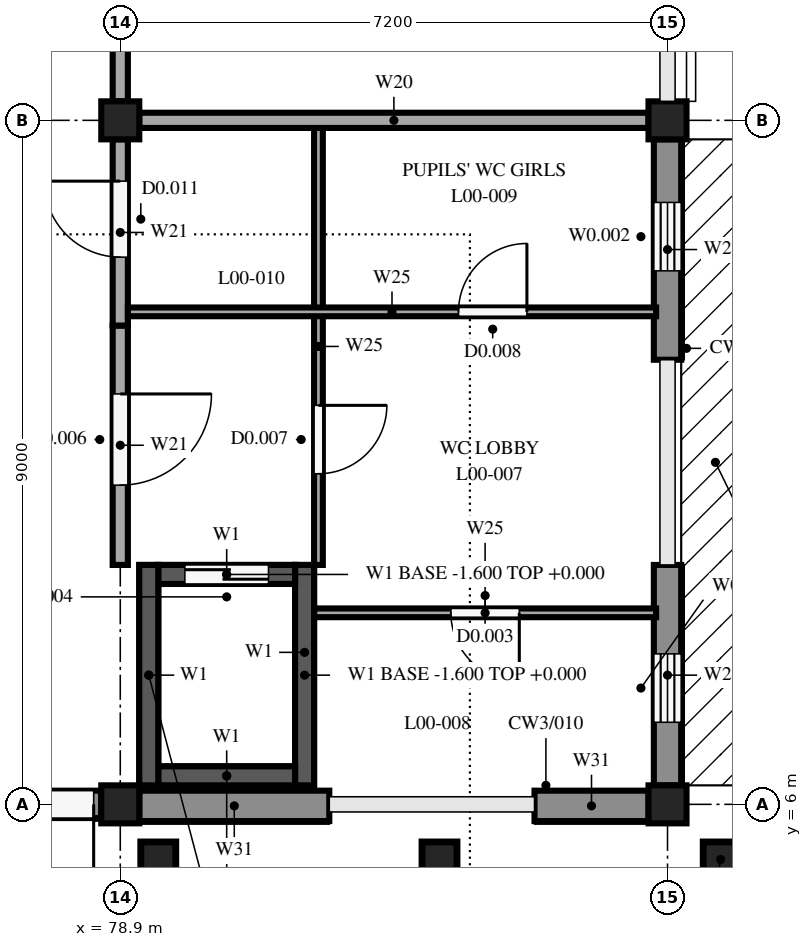
"""IFC4 building model, lengths in metres.
Left out: names, types, materials, properties, quantities, classifications, styles, units other than length and angle.
Written with IfcOpenShell. Run it as: python <this file> out.ifc"""

import sys

from ifc_helpers import new_model, si_unit, direction, frame, frame_2d, origin, origin_2d, place, context, subcontext, project, spatial, rectangle, extrude, element, fill, save


model = new_model("IFC4")
c1 = context("Model", 3, precision=1e-05, world=origin(), true_north=direction((0.0, 1.0)))
c2 = subcontext(c1, "Body", "Model", "MODEL_VIEW")
j1 = project(units=[si_unit("LENGTHUNIT", "METRE"), si_unit("PLANEANGLEUNIT", "RADIAN")], contexts=[c1])
p1 = place(None, origin())
s1 = spatial("IfcSite", under=j1, at=p1, CompositionType="ELEMENT")
p2 = place(p1, origin())
s2 = spatial("IfcBuilding", under=s1, at=p2, CompositionType="ELEMENT")
p3 = place(p2, origin())
s3 = spatial("IfcBuildingStorey", under=s2, at=p3, CompositionType="ELEMENT", Elevation=0.0)
for number, where, z_axis, x_axis in (
    (1, (78.9, 6.0, 0.0), (0.0, 0.0, 1.0), (1.0, 0.0, 0.0)),
    (2, (78.9, 15.0, 0.0), (0.0, 0.0, 1.0), (1.0, 0.0, 0.0)),
    (3, (86.1, 6.0, 0.0), (0.0, 0.0, 1.0), (1.0, 0.0, 0.0)),
    (4, (86.1, 15.0, 0.0), (0.0, 0.0, 1.0), (1.0, 0.0, 0.0)),
):
    element("IfcColumn", number, at=place(p3, frame(where, z_axis=z_axis, x_axis=x_axis)), inside=s3, PredefinedType="COLUMN", context=c2, shape_type="SweptSolid", body=[
        extrude(rectangle(XDim=0.5, YDim=0.5, at=origin_2d()), origin(), (0.0, 0.0, 1.0), 4.25),
    ])
for number, where, z_axis, x_axis in (
    (5, (79.275, 6.25, 0.0), (0.0, 0.0, 1.0), (0.0, 1.0, 0.0)),
    (6, (81.325, 6.25, 0.0), (0.0, 0.0, 1.0), (0.0, 1.0, 0.0)),
):
    element("IfcWall", number, at=place(p3, frame(where, z_axis=z_axis, x_axis=x_axis)), inside=s3, PredefinedType="SHEAR", context=c2, shape_type="SweptSolid", body=[
        extrude(rectangle(XDim=2.9, YDim=0.25, at=frame_2d((1.45, 0.0))), origin(), (0.0, 0.0, 1.0), 4.25),
    ])
p4 = place(p3, frame((79.4, 6.375, 0.0), z_axis=(0.0, 0.0, 1.0), x_axis=(1.0, 0.0, 0.0)))
e7 = element("IfcWall", 7, at=p4, inside=s3, PredefinedType="SHEAR", context=c2, shape_type="SweptSolid", body=[
    extrude(rectangle(XDim=1.8, YDim=0.25, at=frame_2d((0.9, 0.0))), origin(), (0.0, 0.0, 1.0), 4.25),
])
p5 = place(p3, frame((79.4, 9.025, 0.0), z_axis=(0.0, 0.0, 1.0), x_axis=(1.0, 0.0, 0.0)))
e8 = element("IfcWall", 8, at=p5, inside=s3, PredefinedType="SHEAR", context=c2, shape_type="SweptSolid", body=[
    extrude(rectangle(XDim=1.8, YDim=0.25, at=frame_2d((0.9, 0.0))), origin(), (0.0, 0.0, 1.0), 4.25),
])
p6 = place(p5, frame((0.35, 0.0, 0.0)))
e9 = element("IfcOpeningElement", 9, at=p6, cuts=e8, PredefinedType="OPENING", context=c2, shape_type="SweptSolid", body=[
    extrude(rectangle(XDim=1.1, YDim=2.1, at=frame_2d((0.55, 1.05))), frame((0.0, 0.135, 0.0), z_axis=(0.0, -1.0, 0.0), x_axis=(1.0, 0.0, 0.0)), (0.0, 0.0, 1.0), 0.27),
])
for number, where, z_axis, x_axis in (
    (10, (79.275, 6.25, -1.6), (0.0, 0.0, 1.0), (0.0, 1.0, 0.0)),
    (11, (81.325, 6.25, -1.6), (0.0, 0.0, 1.0), (0.0, 1.0, 0.0)),
):
    element("IfcWall", number, at=place(p3, frame(where, z_axis=z_axis, x_axis=x_axis)), inside=s3, PredefinedType="SHEAR", context=c2, shape_type="SweptSolid", body=[
        extrude(rectangle(XDim=2.9, YDim=0.25, at=frame_2d((1.45, 0.0))), origin(), (0.0, 0.0, 1.0), 1.6),
    ])
for number, where, z_axis, x_axis in (
    (12, (79.4, 6.375, -1.6), (0.0, 0.0, 1.0), (1.0, 0.0, 0.0)),
    (13, (79.4, 9.025, -1.6), (0.0, 0.0, 1.0), (1.0, 0.0, 0.0)),
):
    element("IfcWall", number, at=place(p3, frame(where, z_axis=z_axis, x_axis=x_axis)), inside=s3, PredefinedType="SHEAR", context=c2, shape_type="SweptSolid", body=[
        extrude(rectangle(XDim=1.8, YDim=0.25, at=frame_2d((0.9, 0.0))), origin(), (0.0, 0.0, 1.0), 1.6),
    ])
for number, where, z_axis, x_axis in (
    (14, (79.4, 5.275, -0.3), (0.0, 0.0, 1.0), (1.0, 0.0, 0.0)),
    (15, (83.1, 5.275, -0.3), (0.0, 0.0, 1.0), (1.0, 0.0, 0.0)),
    (16, (86.8, 5.275, -0.3), (0.0, 0.0, 1.0), (1.0, 0.0, 0.0)),
):
    element("IfcColumn", number, at=place(p3, frame(where, z_axis=z_axis, x_axis=x_axis)), inside=s3, PredefinedType="COLUMN", context=c2, shape_type="SweptSolid", body=[
        extrude(rectangle(XDim=0.45, YDim=0.45, at=origin_2d()), origin(), (0.0, 0.0, 1.0), 3.95),
    ])
p7 = place(p3, frame((86.1, 9.15, 0.0), z_axis=(0.0, 0.0, 1.0), x_axis=(0.0, -1.0, 0.0)))
e17 = element("IfcWall", 17, at=p7, inside=s3, PredefinedType="STANDARD", context=c2, shape_type="SweptSolid", body=[
    extrude(rectangle(XDim=2.9, YDim=0.36, at=frame_2d((1.45, 0.0))), origin(), (0.0, 0.0, 1.0), 3.75),
])
p8 = place(p7, frame((1.17, 0.0, 1.6)))
e18 = element("IfcOpeningElement", 18, at=p8, cuts=e17, PredefinedType="OPENING", context=c2, shape_type="SweptSolid", body=[
    extrude(rectangle(XDim=0.9, YDim=1.0, at=frame_2d((0.45, 0.5))), frame((0.0, 0.19, 0.0), z_axis=(0.0, -1.0, 0.0), x_axis=(1.0, 0.0, 0.0)), (0.0, 0.0, 1.0), 0.38),
])
p9 = place(p3, frame((86.1, 14.75, 0.0), z_axis=(0.0, 0.0, 1.0), x_axis=(0.0, -1.0, 0.0)))
e19 = element("IfcWall", 19, at=p9, inside=s3, PredefinedType="STANDARD", context=c2, shape_type="SweptSolid", body=[
    extrude(rectangle(XDim=2.9, YDim=0.36, at=frame_2d((1.45, 0.0))), origin(), (0.0, 0.0, 1.0), 3.75),
])
p10 = place(p9, frame((0.83, 0.0, 1.6)))
e20 = element("IfcOpeningElement", 20, at=p10, cuts=e19, PredefinedType="OPENING", context=c2, shape_type="SweptSolid", body=[
    extrude(rectangle(XDim=0.9, YDim=1.0, at=frame_2d((0.45, 0.5))), frame((0.0, 0.19, 0.0), z_axis=(0.0, -1.0, 0.0), x_axis=(1.0, 0.0, 0.0)), (0.0, 0.0, 1.0), 0.38),
])
p11 = place(p3, frame((78.65, 6.0, 0.0), z_axis=(0.0, 0.0, 1.0), x_axis=(-1.0, 0.0, 0.0)))
e21 = element("IfcWall", 21, at=p11, inside=s3, PredefinedType="STANDARD", context=c2, shape_type="SweptSolid", body=[
    extrude(rectangle(XDim=2.2, YDim=0.36, at=frame_2d((1.1, 0.0))), origin(), (0.0, 0.0, 1.0), 3.9),
])
p12 = place(p11, frame((0.1, 0.0, 0.0)))
e22 = element("IfcOpeningElement", 22, at=p12, cuts=e21, PredefinedType="OPENING", context=c2, shape_type="SweptSolid", body=[
    extrude(rectangle(XDim=2.0, YDim=2.4, at=frame_2d((1.0, 1.2))), frame((0.0, 0.19, 0.0), z_axis=(0.0, -1.0, 0.0), x_axis=(1.0, 0.0, 0.0)), (0.0, 0.0, 1.0), 0.38),
])
p13 = place(p3, frame((81.65, 5.98, 0.0), z_axis=(0.0, 0.0, 1.0), x_axis=(-1.0, 0.0, 0.0)))
e23 = element("IfcWall", 23, at=p13, inside=s3, PredefinedType="STANDARD", context=c2, shape_type="SweptSolid", body=[
    extrude(rectangle(XDim=2.5, YDim=0.4, at=frame_2d((1.25, 0.0))), origin(), (0.0, 0.0, 1.0), 3.8),
])
p14 = place(p3, frame((85.85, 5.98, 0.0), z_axis=(0.0, 0.0, 1.0), x_axis=(-1.0, 0.0, 0.0)))
e24 = element("IfcWall", 24, at=p14, inside=s3, PredefinedType="STANDARD", context=c2, shape_type="SweptSolid", body=[
    extrude(rectangle(XDim=1.5, YDim=0.4, at=frame_2d((0.75, 0.0))), origin(), (0.0, 0.0, 1.0), 3.8),
])
p15 = place(p3, frame((78.9, 12.3, 0.0), z_axis=(0.0, 0.0, 1.0), x_axis=(0.0, -1.0, 0.0)))
e25 = element("IfcWall", 25, at=p15, inside=s3, PredefinedType="PARTITIONING", context=c2, shape_type="SweptSolid", body=[
    extrude(rectangle(XDim=3.15, YDim=0.2, at=frame_2d((1.575, 0.0))), origin(), (0.0, 0.0, 1.0), 3.8),
])
p16 = place(p15, frame((0.9, 0.0, 0.0)))
e26 = element("IfcOpeningElement", 26, at=p16, cuts=e25, PredefinedType="OPENING", context=c2, shape_type="SweptSolid", body=[
    extrude(rectangle(XDim=1.2, YDim=2.1, at=frame_2d((0.6, 1.05))), frame((0.0, 0.11, 0.0), z_axis=(0.0, -1.0, 0.0), x_axis=(1.0, 0.0, 0.0)), (0.0, 0.0, 1.0), 0.22),
])
p17 = place(p3, frame((78.9, 12.3, 0.0), z_axis=(0.0, 0.0, 1.0), x_axis=(0.0, 1.0, 0.0)))
e27 = element("IfcWall", 27, at=p17, inside=s3, PredefinedType="PARTITIONING", context=c2, shape_type="SweptSolid", body=[
    extrude(rectangle(XDim=2.45, YDim=0.2, at=frame_2d((1.225, 0.0))), origin(), (0.0, 0.0, 1.0), 3.8),
])
p18 = place(p17, frame((0.9, 0.0, 0.0)))
e28 = element("IfcOpeningElement", 28, at=p18, cuts=e27, PredefinedType="OPENING", context=c2, shape_type="SweptSolid", body=[
    extrude(rectangle(XDim=1.0, YDim=2.1, at=frame_2d((0.5, 1.05))), frame((0.0, 0.11, 0.0), z_axis=(0.0, -1.0, 0.0), x_axis=(1.0, 0.0, 0.0)), (0.0, 0.0, 1.0), 0.22),
])
p19 = place(p3, frame((79.15, 15.0, 0.0), z_axis=(0.0, 0.0, 1.0), x_axis=(1.0, 0.0, 0.0)))
e29 = element("IfcWall", 29, at=p19, inside=s3, PredefinedType="PARTITIONING", context=c2, shape_type="SweptSolid", body=[
    extrude(rectangle(XDim=6.7, YDim=0.2, at=frame_2d((3.35, 0.0))), origin(), (0.0, 0.0, 1.0), 3.8),
])
p20 = place(p3, frame((81.508, 14.9, 0.0), z_axis=(0.0, 0.0, 1.0), x_axis=(0.0, -1.0, 0.0)))
e30 = element("IfcWall", 30, at=p20, inside=s3, PredefinedType="PARTITIONING", context=c2, shape_type="SweptSolid", body=[
    extrude(rectangle(XDim=5.75, YDim=0.115, at=frame_2d((2.875, 0.0))), origin(), (0.0, 0.0, 1.0), 4.25),
])
p21 = place(p20, frame((3.65, 0.0, 0.0)))
e31 = element("IfcOpeningElement", 31, at=p21, cuts=e30, PredefinedType="OPENING", context=c2, shape_type="SweptSolid", body=[
    extrude(rectangle(XDim=0.9, YDim=2.1, at=frame_2d((0.45, 1.05))), frame((0.0, 0.067, 0.0), z_axis=(0.0, -1.0, 0.0), x_axis=(1.0, 0.0, 0.0)), (0.0, 0.0, 1.0), 0.135),
])
p22 = place(p3, frame((85.95, 8.52, 0.0), z_axis=(0.0, 0.0, 1.0), x_axis=(-1.0, 0.0, 0.0)))
e32 = element("IfcWall", 32, at=p22, inside=s3, PredefinedType="PARTITIONING", context=c2, shape_type="SweptSolid", body=[
    extrude(rectangle(XDim=4.5, YDim=0.115, at=frame_2d((2.25, 0.0))), origin(), (0.0, 0.0, 1.0), 4.25),
])
p23 = place(p22, frame((1.8, 0.0, 0.0)))
e33 = element("IfcOpeningElement", 33, at=p23, cuts=e32, PredefinedType="OPENING", context=c2, shape_type="SweptSolid", body=[
    extrude(rectangle(XDim=0.9, YDim=2.1, at=frame_2d((0.45, 1.05))), frame((0.0, 0.067, 0.0), z_axis=(0.0, -1.0, 0.0), x_axis=(1.0, 0.0, 0.0)), (0.0, 0.0, 1.0), 0.135),
])
p24 = place(p3, frame((79.0, 12.48, 0.0), z_axis=(0.0, 0.0, 1.0), x_axis=(1.0, 0.0, 0.0)))
e34 = element("IfcWall", 34, at=p24, inside=s3, PredefinedType="PARTITIONING", context=c2, shape_type="SweptSolid", body=[
    extrude(rectangle(XDim=6.95, YDim=0.115, at=frame_2d((3.475, 0.0))), origin(), (0.0, 0.0, 1.0), 4.25),
])
p25 = place(p24, frame((4.35, 0.0, 0.0)))
e35 = element("IfcOpeningElement", 35, at=p25, cuts=e34, PredefinedType="OPENING", context=c2, shape_type="SweptSolid", body=[
    extrude(rectangle(XDim=0.9, YDim=2.1, at=frame_2d((0.45, 1.05))), frame((0.0, 0.067, 0.0), z_axis=(0.0, -1.0, 0.0), x_axis=(1.0, 0.0, 0.0)), (0.0, 0.0, 1.0), 0.135),
])
p26 = place(p3, frame((78.9, 23.75, 0.0), z_axis=(0.0, 0.0, 1.0), x_axis=(0.0, -1.0, 0.0)))
e36 = element("IfcWall", 36, at=p26, inside=s3, PredefinedType="PARTITIONING", context=c2, shape_type="SweptSolid", body=[
    extrude(rectangle(XDim=8.5, YDim=0.2, at=frame_2d((4.25, 0.0))), origin(), (0.0, 0.0, 1.0), 3.8),
])
p27 = place(p26, frame((3.5, 0.0, 0.0)))
e37 = element("IfcOpeningElement", 37, at=p27, cuts=e36, PredefinedType="OPENING", context=c2, shape_type="SweptSolid", body=[
    extrude(rectangle(XDim=1.5, YDim=2.1, at=frame_2d((0.75, 1.05))), frame((0.0, 0.11, 0.0), z_axis=(0.0, -1.0, 0.0), x_axis=(1.0, 0.0, 0.0)), (0.0, 0.0, 1.0), 0.22),
])
p28 = place(p8, origin())
e38 = element("IfcWindow", 38, at=p28, inside=s3, PartitioningType="SINGLE_PANEL", PredefinedType="WINDOW", context=c2, shape_type="SweptSolid", body=[
    extrude(rectangle(XDim=0.9, YDim=1.0, at=frame_2d((0.45, 0.5))), frame((0.0, 0.03, 0.0), z_axis=(0.0, -1.0, 0.0), x_axis=(1.0, 0.0, 0.0)), (0.0, 0.0, 1.0), 0.06),
])
fill(e18, e38)
p29 = place(p10, origin())
e39 = element("IfcWindow", 39, at=p29, inside=s3, PartitioningType="SINGLE_PANEL", PredefinedType="WINDOW", context=c2, shape_type="SweptSolid", body=[
    extrude(rectangle(XDim=0.9, YDim=1.0, at=frame_2d((0.45, 0.5))), frame((0.0, 0.03, 0.0), z_axis=(0.0, -1.0, 0.0), x_axis=(1.0, 0.0, 0.0)), (0.0, 0.0, 1.0), 0.06),
])
fill(e20, e39)
p30 = place(p12, origin())
e40 = element("IfcDoor", 40, at=p30, inside=s3, OperationType="DOUBLE_DOOR_SINGLE_SWING", PredefinedType="DOOR", context=c2, shape_type="SweptSolid", body=[
    extrude(rectangle(XDim=2.0, YDim=2.4, at=frame_2d((1.0, 1.2))), frame((0.0, 0.025, 0.0), z_axis=(0.0, -1.0, 0.0), x_axis=(1.0, 0.0, 0.0)), (0.0, 0.0, 1.0), 0.05),
])
fill(e22, e40)
p31 = place(p16, origin())
e41 = element("IfcDoor", 41, at=p31, inside=s3, OperationType="SINGLE_SWING_LEFT", PredefinedType="DOOR", context=c2, shape_type="SweptSolid", body=[
    extrude(rectangle(XDim=1.2, YDim=2.1, at=frame_2d((0.6, 1.05))), frame((0.0, 0.025, 0.0), z_axis=(0.0, -1.0, 0.0), x_axis=(1.0, 0.0, 0.0)), (0.0, 0.0, 1.0), 0.05),
])
fill(e26, e41)
p32 = place(p18, origin())
e42 = element("IfcDoor", 42, at=p32, inside=s3, OperationType="SINGLE_SWING_RIGHT", PredefinedType="DOOR", context=c2, shape_type="SweptSolid", body=[
    extrude(rectangle(XDim=1.0, YDim=2.1, at=frame_2d((0.5, 1.05))), frame((0.0, 0.025, 0.0), z_axis=(0.0, -1.0, 0.0), x_axis=(1.0, 0.0, 0.0)), (0.0, 0.0, 1.0), 0.05),
])
fill(e28, e42)
p33 = place(p21, origin())
e43 = element("IfcDoor", 43, at=p33, inside=s3, OperationType="SINGLE_SWING_LEFT", PredefinedType="DOOR", context=c2, shape_type="SweptSolid", body=[
    extrude(rectangle(XDim=0.9, YDim=2.1, at=frame_2d((0.45, 1.05))), frame((0.0, 0.025, 0.0), z_axis=(0.0, -1.0, 0.0), x_axis=(1.0, 0.0, 0.0)), (0.0, 0.0, 1.0), 0.05),
])
fill(e31, e43)
p34 = place(p23, origin())
e44 = element("IfcDoor", 44, at=p34, inside=s3, OperationType="SINGLE_SWING_LEFT", PredefinedType="DOOR", context=c2, shape_type="SweptSolid", body=[
    extrude(rectangle(XDim=0.9, YDim=2.1, at=frame_2d((0.45, 1.05))), frame((0.0, 0.025, 0.0), z_axis=(0.0, -1.0, 0.0), x_axis=(1.0, 0.0, 0.0)), (0.0, 0.0, 1.0), 0.05),
])
fill(e33, e44)
p35 = place(p25, origin())
e45 = element("IfcDoor", 45, at=p35, inside=s3, OperationType="SINGLE_SWING_RIGHT", PredefinedType="DOOR", context=c2, shape_type="SweptSolid", body=[
    extrude(rectangle(XDim=0.9, YDim=2.1, at=frame_2d((0.45, 1.05))), frame((0.0, 0.025, 0.0), z_axis=(0.0, -1.0, 0.0), x_axis=(1.0, 0.0, 0.0)), (0.0, 0.0, 1.0), 0.05),
])
fill(e35, e45)
p36 = place(p6, origin())
e46 = element("IfcDoor", 46, at=p36, inside=s3, OperationType="SLIDING_TO_LEFT", PredefinedType="DOOR", context=c2, shape_type="SweptSolid", body=[
    extrude(rectangle(XDim=1.1, YDim=2.1, at=frame_2d((0.55, 1.05))), frame((0.0, 0.025, 0.0), z_axis=(0.0, -1.0, 0.0), x_axis=(1.0, 0.0, 0.0)), (0.0, 0.0, 1.0), 0.05),
])
fill(e9, e46)
save(model, sys.argv[1])
